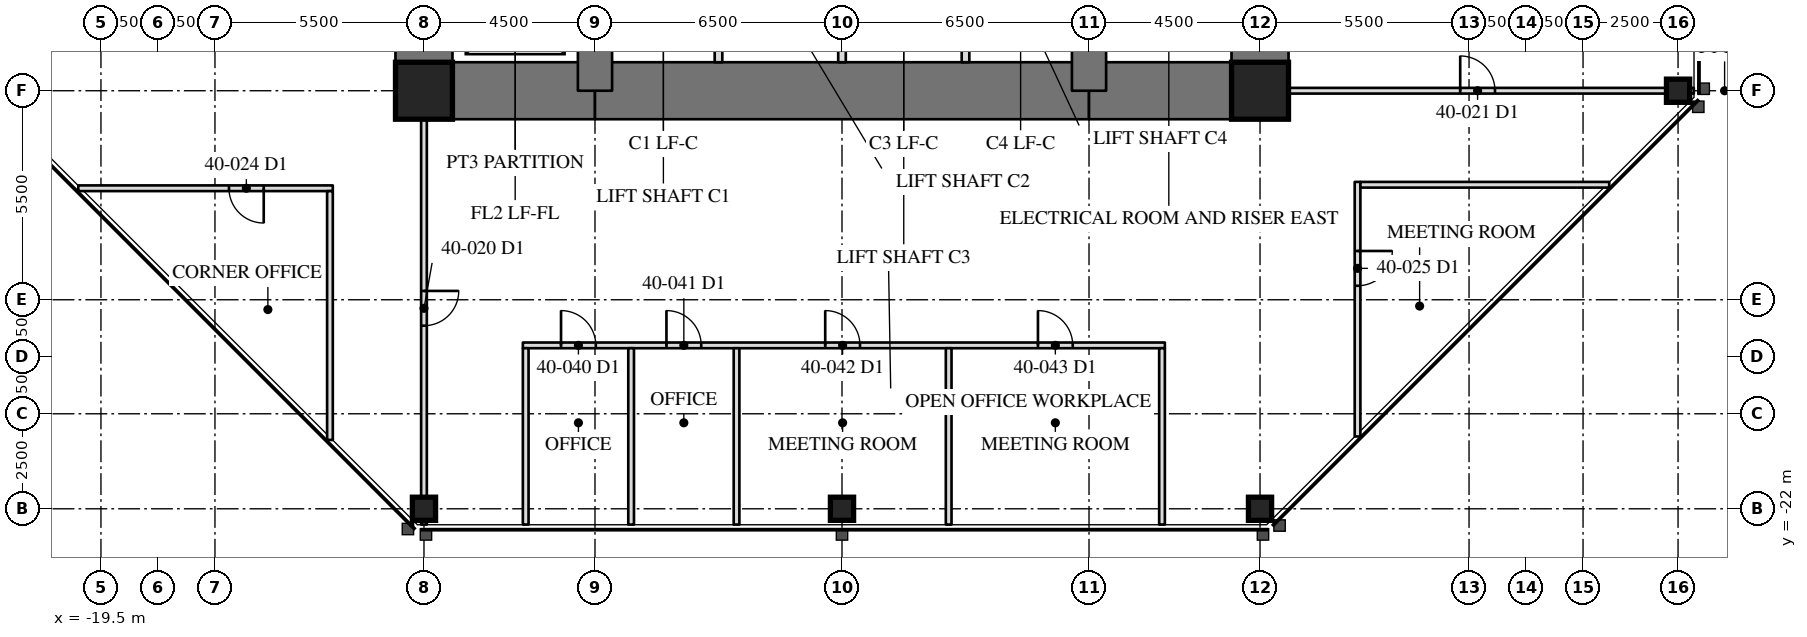
"""IFC4 building model, lengths in metres.
Left out: names, types, materials, properties, quantities, classifications, styles, units other than length and angle.
Written with IfcOpenShell. Run it as: python <this file> out.ifc"""

import sys

from ifc_helpers import new_model, si_unit, direction, frame, frame_2d, origin, origin_2d, place, context, subcontext, project, spatial, rectangle, hollow_rectangle, extrude, element, fill, save


model = new_model("IFC4")
c1 = context("Model", 3, precision=1e-05, world=origin(), true_north=direction((0.0, 1.0)))
c2 = subcontext(c1, "Body", "Model", "MODEL_VIEW")
j1 = project(units=[si_unit("LENGTHUNIT", "METRE"), si_unit("PLANEANGLEUNIT", "RADIAN")], contexts=[c1])
p1 = place(None, origin())
s1 = spatial("IfcSite", under=j1, at=p1, CompositionType="ELEMENT")
p2 = place(p1, origin())
s2 = spatial("IfcBuilding", under=s1, at=p2, CompositionType="ELEMENT")
p3 = place(p2, frame((0.0, 0.0, 170.5)))
s3 = spatial("IfcBuildingStorey", under=s2, at=p3, CompositionType="ELEMENT", Elevation=170.5)
for number, where, z_axis, x_axis in (
    (1, (-11.0, -22.0, 0.0), (0.0, 0.0, 1.0), (1.0, 0.0, 0.0)),
    (2, (0.0, -22.0, 0.0), (0.0, 0.0, 1.0), (1.0, 0.0, 0.0)),
    (3, (11.0, -22.0, 0.0), (0.0, 0.0, 1.0), (1.0, 0.0, 0.0)),
    (4, (22.0, -11.0, 0.0), (0.0, 0.0, 1.0), (0.0, 1.0, 0.0)),
):
    element("IfcColumn", number, at=place(p3, frame(where, z_axis=z_axis, x_axis=x_axis)), inside=s3, PredefinedType="COLUMN", context=c2, shape_type="SweptSolid", body=[
        extrude(hollow_rectangle(XDim=0.61, YDim=0.61, WallThickness=0.076, at=origin_2d()), origin(), (0.0, 0.0, 1.0), 4.1),
    ])
p4 = place(p3, frame((11.0, -11.0, 0.0), z_axis=(0.0, 0.0, 1.0), x_axis=(0.0, 1.0, 0.0)))
e5 = element("IfcWall", 5, at=p4, inside=s3, PredefinedType="SHEAR", context=c2, shape_type="SweptSolid", body=[
    extrude(rectangle(XDim=22.0, YDim=1.5, at=frame_2d((11.0, 0.0))), origin(), (0.0, 0.0, 1.0), 4.1),
])
p5 = place(p4, frame((15.393, 0.0, 0.0)))
e6 = element("IfcOpeningElement", 6, at=p5, cuts=e5, PredefinedType="OPENING", context=c2, shape_type="SweptSolid", body=[
    extrude(rectangle(XDim=0.915, YDim=2.134, at=frame_2d((0.458, 1.067))), frame((0.0, 0.76, 0.0), z_axis=(0.0, -1.0, 0.0), x_axis=(1.0, 0.0, 0.0)), (0.0, 0.0, 1.0), 1.52),
])
p6 = place(p3, frame((-11.0, 11.0, 0.0), z_axis=(0.0, 0.0, 1.0), x_axis=(0.0, -1.0, 0.0)))
e7 = element("IfcWall", 7, at=p6, inside=s3, PredefinedType="SHEAR", context=c2, shape_type="SweptSolid", body=[
    extrude(rectangle(XDim=22.0, YDim=1.5, at=frame_2d((11.0, 0.0))), origin(), (0.0, 0.0, 1.0), 4.1),
])
p7 = place(p6, frame((15.393, 0.0, 0.0)))
e8 = element("IfcOpeningElement", 8, at=p7, cuts=e7, PredefinedType="OPENING", context=c2, shape_type="SweptSolid", body=[
    extrude(rectangle(XDim=0.915, YDim=2.134, at=frame_2d((0.458, 1.067))), frame((0.0, 0.76, 0.0), z_axis=(0.0, -1.0, 0.0), x_axis=(1.0, 0.0, 0.0)), (0.0, 0.0, 1.0), 1.52),
])
p8 = place(p3, frame((-11.0, -11.0, 0.0), z_axis=(0.0, 0.0, 1.0), x_axis=(1.0, 0.0, 0.0)))
e9 = element("IfcWall", 9, at=p8, inside=s3, PredefinedType="SHEAR", context=c2, shape_type="SweptSolid", body=[
    extrude(rectangle(XDim=4.5, YDim=1.5, at=frame_2d((2.25, 0.0))), origin(), (0.0, 0.0, 1.0), 4.1),
])
p9 = place(p3, frame((-6.5, -11.0, 0.0), z_axis=(0.0, 0.0, 1.0), x_axis=(1.0, 0.0, 0.0)))
e10 = element("IfcWall", 10, at=p9, inside=s3, PredefinedType="SHEAR", context=c2, shape_type="SweptSolid", body=[
    extrude(rectangle(XDim=13.0, YDim=1.5, at=frame_2d((6.5, 0.0))), origin(), (0.0, 0.0, 1.0), 4.1),
])
p10 = place(p3, frame((6.5, -11.0, 0.0), z_axis=(0.0, 0.0, 1.0), x_axis=(1.0, 0.0, 0.0)))
e11 = element("IfcWall", 11, at=p10, inside=s3, PredefinedType="SHEAR", context=c2, shape_type="SweptSolid", body=[
    extrude(rectangle(XDim=4.5, YDim=1.5, at=frame_2d((2.25, 0.0))), origin(), (0.0, 0.0, 1.0), 4.1),
])
for number, where, z_axis, x_axis in (
    (12, (6.5, -11.0, 0.0), (0.0, 0.0, 1.0), (0.0, 1.0, 0.0)),
    (13, (-6.5, -6.5, 0.0), (0.0, 0.0, 1.0), (0.0, -1.0, 0.0)),
):
    element("IfcWall", number, at=place(p3, frame(where, z_axis=z_axis, x_axis=x_axis)), inside=s3, PredefinedType="SHEAR", context=c2, shape_type="SweptSolid", body=[
        extrude(rectangle(XDim=4.5, YDim=0.9, at=frame_2d((2.25, 0.0))), origin(), (0.0, 0.0, 1.0), 4.1),
    ])
for number, where, z_axis, x_axis in (
    (14, (-11.0, -11.0, 0.0), (0.0, 0.0, 1.0), (1.0, 0.0, 0.0)),
    (15, (11.0, -11.0, 0.0), (0.0, 0.0, 1.0), (1.0, 0.0, 0.0)),
):
    element("IfcColumn", number, at=place(p3, frame(where, z_axis=z_axis, x_axis=x_axis)), inside=s3, PredefinedType="COLUMN", context=c2, shape_type="SweptSolid", body=[
        extrude(hollow_rectangle(XDim=1.499, YDim=1.499, WallThickness=0.102, at=origin_2d()), origin(), (0.0, 0.0, 1.0), 4.1),
    ])
for number, where, z_axis, x_axis in (
    (16, (-3.25, -10.25, 0.0), (0.0, 0.0, 1.0), (0.0, 1.0, 0.0)),
    (17, (0.0, -10.25, 0.0), (0.0, 0.0, 1.0), (0.0, 1.0, 0.0)),
    (18, (3.25, -10.25, 0.0), (0.0, 0.0, 1.0), (0.0, 1.0, 0.0)),
):
    element("IfcWall", number, at=place(p3, frame(where, z_axis=z_axis, x_axis=x_axis)), inside=s3, PredefinedType="PARTITIONING", context=c2, shape_type="SweptSolid", body=[
        extrude(rectangle(XDim=3.3, YDim=0.2, at=frame_2d((1.65, 0.0))), origin(), (0.0, 0.0, 1.0), 3.91),
    ])
p11 = place(p3, frame((-11.0, -11.75, 0.0), z_axis=(0.0, 0.0, 1.0), x_axis=(0.0, -1.0, 0.0)))
e19 = element("IfcWall", 19, at=p11, inside=s3, PredefinedType="PARTITIONING", context=c2, shape_type="SweptSolid", body=[
    extrude(rectangle(XDim=10.665, YDim=0.15, at=frame_2d((5.333, 0.0))), origin(), (0.0, 0.0, 1.0), 3.326),
])
p12 = place(p11, frame((4.518, 0.0, 0.0)))
e20 = element("IfcOpeningElement", 20, at=p12, cuts=e19, PredefinedType="OPENING", context=c2, shape_type="SweptSolid", body=[
    extrude(rectangle(XDim=0.915, YDim=2.134, at=frame_2d((0.458, 1.067))), frame((0.0, 0.085, 0.0), z_axis=(0.0, -1.0, 0.0), x_axis=(1.0, 0.0, 0.0)), (0.0, 0.0, 1.0), 0.17),
])
p13 = place(p3, frame((11.75, -11.0, 0.0), z_axis=(0.0, 0.0, 1.0), x_axis=(1.0, 0.0, 0.0)))
e21 = element("IfcWall", 21, at=p13, inside=s3, PredefinedType="PARTITIONING", context=c2, shape_type="SweptSolid", body=[
    extrude(rectangle(XDim=10.665, YDim=0.15, at=frame_2d((5.333, 0.0))), origin(), (0.0, 0.0, 1.0), 3.326),
])
p14 = place(p13, frame((4.518, 0.0, 0.0)))
e22 = element("IfcOpeningElement", 22, at=p14, cuts=e21, PredefinedType="OPENING", context=c2, shape_type="SweptSolid", body=[
    extrude(rectangle(XDim=0.915, YDim=2.134, at=frame_2d((0.458, 1.067))), frame((0.0, 0.085, 0.0), z_axis=(0.0, -1.0, 0.0), x_axis=(1.0, 0.0, 0.0)), (0.0, 0.0, 1.0), 0.17),
])
p15 = place(p3, frame((-13.399, -13.566, 0.0), z_axis=(0.0, 0.0, 1.0), x_axis=(-1.0, 0.0, 0.0)))
e23 = element("IfcWall", 23, at=p15, inside=s3, PredefinedType="PARTITIONING", context=c2, shape_type="SweptSolid", body=[
    extrude(rectangle(XDim=6.698, YDim=0.15, at=frame_2d((3.349, 0.0))), origin(), (0.0, 0.0, 1.0), 3.91),
])
p16 = place(p15, frame((1.817, 0.0, 0.0)))
e24 = element("IfcOpeningElement", 24, at=p16, cuts=e23, PredefinedType="OPENING", context=c2, shape_type="SweptSolid", body=[
    extrude(rectangle(XDim=0.915, YDim=2.134, at=frame_2d((0.458, 1.067))), frame((0.0, 0.085, 0.0), z_axis=(0.0, -1.0, 0.0), x_axis=(1.0, 0.0, 0.0)), (0.0, 0.0, 1.0), 0.17),
])
p17 = place(p3, frame((-13.474, -13.641, 0.0), z_axis=(0.0, 0.0, 1.0), x_axis=(0.0, -1.0, 0.0)))
e25 = element("IfcWall", 25, at=p17, inside=s3, PredefinedType="PARTITIONING", context=c2, shape_type="SweptSolid", body=[
    extrude(rectangle(XDim=6.548, YDim=0.15, at=frame_2d((3.274, 0.0))), origin(), (0.0, 0.0, 1.0), 3.91),
])
p18 = place(p3, frame((13.566, -13.399, 0.0), z_axis=(0.0, 0.0, 1.0), x_axis=(0.0, -1.0, 0.0)))
e26 = element("IfcWall", 26, at=p18, inside=s3, PredefinedType="PARTITIONING", context=c2, shape_type="SweptSolid", body=[
    extrude(rectangle(XDim=6.698, YDim=0.15, at=frame_2d((3.349, 0.0))), origin(), (0.0, 0.0, 1.0), 3.91),
])
p19 = place(p18, frame((1.817, 0.0, 0.0)))
e27 = element("IfcOpeningElement", 27, at=p19, cuts=e26, PredefinedType="OPENING", context=c2, shape_type="SweptSolid", body=[
    extrude(rectangle(XDim=0.915, YDim=2.134, at=frame_2d((0.458, 1.067))), frame((0.0, 0.085, 0.0), z_axis=(0.0, -1.0, 0.0), x_axis=(1.0, 0.0, 0.0)), (0.0, 0.0, 1.0), 0.17),
])
p20 = place(p3, frame((13.641, -13.474, 0.0), z_axis=(0.0, 0.0, 1.0), x_axis=(1.0, 0.0, 0.0)))
e28 = element("IfcWall", 28, at=p20, inside=s3, PredefinedType="PARTITIONING", context=c2, shape_type="SweptSolid", body=[
    extrude(rectangle(XDim=6.548, YDim=0.15, at=frame_2d((3.274, 0.0))), origin(), (0.0, 0.0, 1.0), 3.91),
])
p21 = place(p3, frame((-8.398, -17.7, 0.0), z_axis=(0.0, 0.0, 1.0), x_axis=(1.0, 0.0, 0.0)))
e29 = element("IfcWall", 29, at=p21, inside=s3, PredefinedType="PARTITIONING", context=c2, shape_type="SweptSolid", body=[
    extrude(rectangle(XDim=16.894, YDim=0.15, at=frame_2d((8.447, 0.0))), origin(), (0.0, 0.0, 1.0), 3.91),
])
p22 = place(p21, frame((1.004, 0.0, 0.0)))
e30 = element("IfcOpeningElement", 30, at=p22, cuts=e29, PredefinedType="OPENING", context=c2, shape_type="SweptSolid", body=[
    extrude(rectangle(XDim=0.915, YDim=2.134, at=frame_2d((0.458, 1.067))), frame((0.0, 0.085, 0.0), z_axis=(0.0, -1.0, 0.0), x_axis=(1.0, 0.0, 0.0)), (0.0, 0.0, 1.0), 0.17),
])
p23 = place(p21, frame((3.779, 0.0, 0.0)))
e31 = element("IfcOpeningElement", 31, at=p23, cuts=e29, PredefinedType="OPENING", context=c2, shape_type="SweptSolid", body=[
    extrude(rectangle(XDim=0.915, YDim=2.134, at=frame_2d((0.458, 1.067))), frame((0.0, 0.085, 0.0), z_axis=(0.0, -1.0, 0.0), x_axis=(1.0, 0.0, 0.0)), (0.0, 0.0, 1.0), 0.17),
])
p24 = place(p21, frame((7.957, 0.0, 0.0)))
e32 = element("IfcOpeningElement", 32, at=p24, cuts=e29, PredefinedType="OPENING", context=c2, shape_type="SweptSolid", body=[
    extrude(rectangle(XDim=0.915, YDim=2.134, at=frame_2d((0.458, 1.067))), frame((0.0, 0.085, 0.0), z_axis=(0.0, -1.0, 0.0), x_axis=(1.0, 0.0, 0.0)), (0.0, 0.0, 1.0), 0.17),
])
p25 = place(p21, frame((13.554, 0.0, 0.0)))
e33 = element("IfcOpeningElement", 33, at=p25, cuts=e29, PredefinedType="OPENING", context=c2, shape_type="SweptSolid", body=[
    extrude(rectangle(XDim=0.915, YDim=2.134, at=frame_2d((0.458, 1.067))), frame((0.0, 0.085, 0.0), z_axis=(0.0, -1.0, 0.0), x_axis=(1.0, 0.0, 0.0)), (0.0, 0.0, 1.0), 0.17),
])
for number, where, z_axis, x_axis in (
    (34, (-8.323, -17.775, 0.0), (0.0, 0.0, 1.0), (0.0, -1.0, 0.0)),
    (35, (-5.549, -17.775, 0.0), (0.0, 0.0, 1.0), (0.0, -1.0, 0.0)),
    (36, (-2.775, -17.775, 0.0), (0.0, 0.0, 1.0), (0.0, -1.0, 0.0)),
    (37, (2.807, -17.775, 0.0), (0.0, 0.0, 1.0), (0.0, -1.0, 0.0)),
    (38, (8.421, -17.775, 0.0), (0.0, 0.0, 1.0), (0.0, -1.0, 0.0)),
):
    element("IfcWall", number, at=place(p3, frame(where, z_axis=z_axis, x_axis=x_axis)), inside=s3, PredefinedType="PARTITIONING", context=c2, shape_type="SweptSolid", body=[
        extrude(rectangle(XDim=4.64, YDim=0.15, at=frame_2d((2.32, 0.0))), origin(), (0.0, 0.0, 1.0), 3.91),
    ])
p26 = place(p12, origin())
e39 = element("IfcDoor", 39, at=p26, inside=s3, OperationType="SINGLE_SWING_LEFT", PredefinedType="DOOR", context=c2, shape_type="SweptSolid", body=[
    extrude(rectangle(XDim=0.915, YDim=2.134, at=frame_2d((0.458, 1.067))), frame((0.0, 0.025, 0.0), z_axis=(0.0, -1.0, 0.0), x_axis=(1.0, 0.0, 0.0)), (0.0, 0.0, 1.0), 0.05),
])
fill(e20, e39)
p27 = place(p14, origin())
e40 = element("IfcDoor", 40, at=p27, inside=s3, OperationType="SINGLE_SWING_LEFT", PredefinedType="DOOR", context=c2, shape_type="SweptSolid", body=[
    extrude(rectangle(XDim=0.915, YDim=2.134, at=frame_2d((0.458, 1.067))), frame((0.0, 0.025, 0.0), z_axis=(0.0, -1.0, 0.0), x_axis=(1.0, 0.0, 0.0)), (0.0, 0.0, 1.0), 0.05),
])
fill(e22, e40)
p28 = place(p16, origin())
e41 = element("IfcDoor", 41, at=p28, inside=s3, OperationType="SINGLE_SWING_LEFT", PredefinedType="DOOR", context=c2, shape_type="SweptSolid", body=[
    extrude(rectangle(XDim=0.915, YDim=2.134, at=frame_2d((0.458, 1.067))), frame((0.0, 0.025, 0.0), z_axis=(0.0, -1.0, 0.0), x_axis=(1.0, 0.0, 0.0)), (0.0, 0.0, 1.0), 0.05),
])
fill(e24, e41)
p29 = place(p19, origin())
e42 = element("IfcDoor", 42, at=p29, inside=s3, OperationType="SINGLE_SWING_LEFT", PredefinedType="DOOR", context=c2, shape_type="SweptSolid", body=[
    extrude(rectangle(XDim=0.915, YDim=2.134, at=frame_2d((0.458, 1.067))), frame((0.0, 0.025, 0.0), z_axis=(0.0, -1.0, 0.0), x_axis=(1.0, 0.0, 0.0)), (0.0, 0.0, 1.0), 0.05),
])
fill(e27, e42)
p30 = place(p22, origin())
e43 = element("IfcDoor", 43, at=p30, inside=s3, OperationType="SINGLE_SWING_LEFT", PredefinedType="DOOR", context=c2, shape_type="SweptSolid", body=[
    extrude(rectangle(XDim=0.915, YDim=2.134, at=frame_2d((0.458, 1.067))), frame((0.0, 0.025, 0.0), z_axis=(0.0, -1.0, 0.0), x_axis=(1.0, 0.0, 0.0)), (0.0, 0.0, 1.0), 0.05),
])
fill(e30, e43)
p31 = place(p23, origin())
e44 = element("IfcDoor", 44, at=p31, inside=s3, OperationType="SINGLE_SWING_LEFT", PredefinedType="DOOR", context=c2, shape_type="SweptSolid", body=[
    extrude(rectangle(XDim=0.915, YDim=2.134, at=frame_2d((0.458, 1.067))), frame((0.0, 0.025, 0.0), z_axis=(0.0, -1.0, 0.0), x_axis=(1.0, 0.0, 0.0)), (0.0, 0.0, 1.0), 0.05),
])
fill(e31, e44)
p32 = place(p24, origin())
e45 = element("IfcDoor", 45, at=p32, inside=s3, OperationType="SINGLE_SWING_LEFT", PredefinedType="DOOR", context=c2, shape_type="SweptSolid", body=[
    extrude(rectangle(XDim=0.915, YDim=2.134, at=frame_2d((0.458, 1.067))), frame((0.0, 0.025, 0.0), z_axis=(0.0, -1.0, 0.0), x_axis=(1.0, 0.0, 0.0)), (0.0, 0.0, 1.0), 0.05),
])
fill(e32, e45)
p33 = place(p25, origin())
e46 = element("IfcDoor", 46, at=p33, inside=s3, OperationType="SINGLE_SWING_LEFT", PredefinedType="DOOR", context=c2, shape_type="SweptSolid", body=[
    extrude(rectangle(XDim=0.915, YDim=2.134, at=frame_2d((0.458, 1.067))), frame((0.0, 0.025, 0.0), z_axis=(0.0, -1.0, 0.0), x_axis=(1.0, 0.0, 0.0)), (0.0, 0.0, 1.0), 0.05),
])
fill(e33, e46)
save(model, sys.argv[1])
